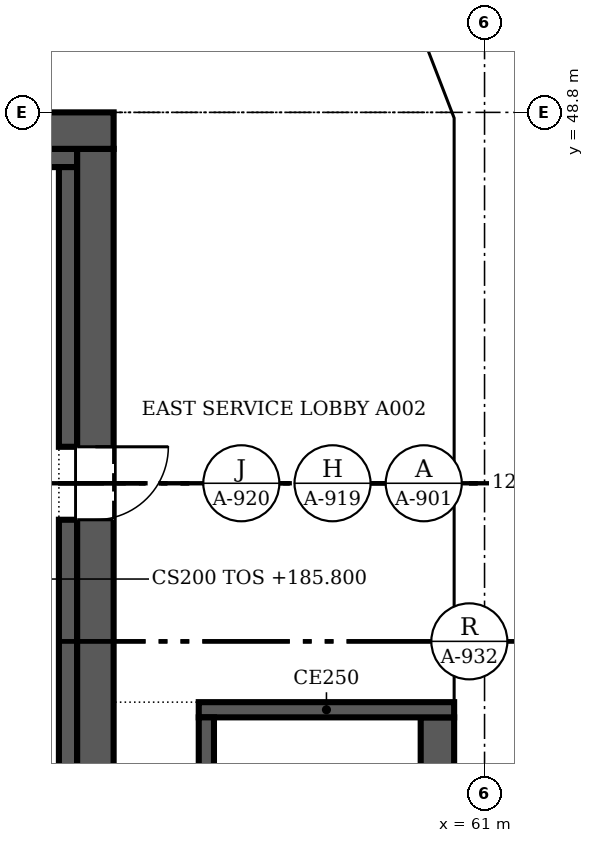
"""IFC4 building model, lengths in metres.
Left out: names, types, materials, properties, quantities, classifications, styles, units other than length and angle.
Written with IfcOpenShell. Run it as: python <this file> out.ifc"""

import sys

from ifc_helpers import new_model, si_unit, direction, frame, frame_2d, origin, place, context, subcontext, project, spatial, polyline, rectangle, outline, extrude, faceted_brep, source, transform, mapped, element, fill, save


model = new_model("IFC4")
c1 = context("Model", 3, precision=1e-05, world=origin(), true_north=direction((0.0, 1.0)))
c2 = subcontext(c1, "Body", "Model", "MODEL_VIEW")
j1 = project(units=[si_unit("LENGTHUNIT", "METRE"), si_unit("PLANEANGLEUNIT", "RADIAN")], contexts=[c1])
p1 = place(None, origin())
s1 = spatial("IfcSite", under=j1, at=p1, CompositionType="ELEMENT")
p2 = place(p1, origin())
s2 = spatial("IfcBuilding", under=s1, at=p2, CompositionType="ELEMENT")
p3 = place(p2, frame((0.0, 0.0, 185.8)))
s3 = spatial("IfcBuildingStorey", under=s2, at=p3, CompositionType="ELEMENT", Elevation=185.8)
m1 = source(origin(), c2, "Body", "Brep", [
    faceted_brep([(3.05, -0.25, 0.0), (6.1, -0.25, 3.8), (6.1, -0.25, 3.8), (3.05, -0.25, 7.6), (0.0, -0.25, 3.8), (0.0, 0.25, 3.8), (3.05, 0.25, 7.6), (6.1, 0.25, 3.8), (6.1, 0.25, 3.8), (3.05, 0.25, 0.0)], [[[0, 1, 2, 3, 4]], [[5, 6, 7, 8, 9]], [[9, 8, 1, 0]], [[7, 6, 3, 2]], [[6, 5, 4, 3]], [[5, 9, 0, 4]], [[1, 8, 7, 2]]]),
])
p4 = place(p3, frame((60.75, 36.6, -3.8), z_axis=(0.0, 0.0, 1.0), x_axis=(0.0, 1.0, 0.0)))
e1 = element("IfcWall", 1, at=p4, inside=s3, PredefinedType="SOLIDWALL", context=c2, shape_type="MappedRepresentation", body=[
    mapped(m1, transform((0.0, 0.0, 0.0), scale=1.0)),
])
m2 = source(origin(), c2, "Body", "SweptSolid", [
    extrude(outline(polyline([(3.05, 0.399), (5.78, 3.8), (3.05, 7.201), (0.321, 3.8), (3.05, 0.399)])), frame((0.0, 0.26, 0.0), z_axis=(0.0, -1.0, 0.0), x_axis=(1.0, 0.0, 0.0)), (0.0, 0.0, 1.0), 0.52),
])
p5 = place(p4, origin())
e2 = element("IfcOpeningElement", 2, at=p5, cuts=e1, PredefinedType="OPENING", context=c2, shape_type="MappedRepresentation", body=[
    mapped(m2, transform((0.0, 0.0, 0.0), scale=1.0)),
])
m3 = source(origin(), c2, "Body", "Brep", [
    faceted_brep([(3.05, -0.25, 0.0), (6.053, -0.25, 3.8), (3.05, -0.25, 7.6), (0.0, -0.25, 3.8), (0.0, 0.25, 3.8), (3.05, 0.25, 7.6), (6.007, 0.25, 3.859), (6.007, 0.25, 3.741), (3.05, 0.25, 0.0), (6.053, 0.0, 3.8)], [[[0, 1, 2, 3]], [[4, 5, 6, 7, 8]], [[8, 7, 9, 1, 0]], [[6, 5, 2, 1, 9]], [[5, 4, 3, 2]], [[4, 8, 0, 3]], [[9, 7, 6]]]),
])
p6 = place(p3, frame((60.75, 42.7, -3.8), z_axis=(0.0, 0.0, 1.0), x_axis=(0.0, 1.0, 0.0)))
e3 = element("IfcWall", 3, at=p6, inside=s3, PredefinedType="SOLIDWALL", context=c2, shape_type="MappedRepresentation", body=[
    mapped(m3, transform((0.0, 0.0, 0.0), scale=1.0)),
])
m4 = source(origin(), c2, "Body", "SweptSolid", [
    extrude(outline(polyline([(3.049, 0.401), (5.735, 3.8), (3.049, 7.199), (0.321, 3.8), (3.049, 0.401)])), frame((0.0, 0.26, 0.0), z_axis=(0.0, -1.0, 0.0), x_axis=(1.0, 0.0, 0.0)), (0.0, 0.0, 1.0), 0.52),
])
p7 = place(p6, origin())
e4 = element("IfcOpeningElement", 4, at=p7, cuts=e3, PredefinedType="OPENING", context=c2, shape_type="MappedRepresentation", body=[
    mapped(m4, transform((0.0, 0.0, 0.0), scale=1.0)),
])
m5 = source(origin(), c2, "Body", "Brep", [
    faceted_brep([(2.95, -0.25, 0.0), (3.003, -0.25, 0.068), (3.003, -0.25, 7.532), (2.95, -0.25, 7.6), (0.0, -0.25, 3.8), (0.047, 0.25, 3.86), (2.898, 0.25, 7.532), (2.898, 0.25, 0.068), (0.047, 0.25, 3.74), (2.95, 0.0, 0.0), (2.95, 0.0, 7.6), (0.0, 0.0, 3.8)], [[[0, 1, 2, 3, 4]], [[5, 6, 7, 8]], [[1, 0, 9]], [[10, 3, 2]], [[6, 5, 11, 4, 3, 10]], [[8, 7, 9, 0, 4, 11]], [[8, 11, 5]], [[1, 9, 7, 6, 10, 2]]]),
])
p8 = place(p3, frame((60.75, 48.753, -3.8), z_axis=(0.0, 0.0, 1.0), x_axis=(-0.35992665181, 0.932980602862, 0.0)))
e5 = element("IfcWall", 5, at=p8, inside=s3, PredefinedType="SOLIDWALL", context=c2, shape_type="MappedRepresentation", body=[
    mapped(m5, transform((0.0, 0.0, 0.0), scale=1.0)),
])
m6 = source(origin(), c2, "Body", "SweptSolid", [
    extrude(outline(polyline([(2.75, 6.935), (0.316, 3.8), (2.75, 0.665), (2.75, 6.935)])), frame((0.0, 0.26, 0.0), z_axis=(0.0, -1.0, 0.0), x_axis=(1.0, 0.0, 0.0)), (0.0, 0.0, 1.0), 0.52),
])
p9 = place(p8, origin())
e6 = element("IfcOpeningElement", 6, at=p9, cuts=e5, PredefinedType="OPENING", context=c2, shape_type="MappedRepresentation", body=[
    mapped(m6, transform((0.0, 0.0, 0.0), scale=1.0)),
])
p10 = place(p2, frame((0.0, 0.0, 189.6)))
s4 = spatial("IfcBuildingStorey", under=s2, at=p10, CompositionType="ELEMENT", Elevation=189.6)
m7 = source(origin(), c2, "Body", "Brep", [
    faceted_brep([(3.05, -0.25, 0.0), (6.1, -0.25, 3.8), (6.1, -0.25, 3.8), (3.05, -0.25, 7.6), (0.0, -0.25, 3.8), (0.0, 0.25, 3.8), (3.05, 0.25, 7.6), (6.1, 0.25, 3.8), (6.1, 0.25, 3.8), (3.05, 0.25, 0.0)], [[[0, 1, 2, 3, 4]], [[5, 6, 7, 8, 9]], [[9, 8, 1, 0]], [[7, 6, 3, 2]], [[6, 5, 4, 3]], [[5, 9, 0, 4]], [[1, 8, 7, 2]]]),
])
p11 = place(p10, frame((60.75, 33.55, -3.8), z_axis=(0.0, 0.0, 1.0), x_axis=(0.0, 1.0, 0.0)))
e7 = element("IfcWall", 7, at=p11, inside=s4, PredefinedType="SOLIDWALL", context=c2, shape_type="MappedRepresentation", body=[
    mapped(m7, transform((0.0, 0.0, 0.0), scale=1.0)),
])
m8 = source(origin(), c2, "Body", "SweptSolid", [
    extrude(outline(polyline([(3.05, 0.399), (5.78, 3.8), (3.05, 7.2), (0.321, 3.8), (3.05, 0.399)])), frame((0.0, 0.26, 0.0), z_axis=(0.0, -1.0, 0.0), x_axis=(1.0, 0.0, 0.0)), (0.0, 0.0, 1.0), 0.52),
])
p12 = place(p11, origin())
e8 = element("IfcOpeningElement", 8, at=p12, cuts=e7, PredefinedType="OPENING", context=c2, shape_type="MappedRepresentation", body=[
    mapped(m8, transform((0.0, 0.0, 0.0), scale=1.0)),
])
m9 = source(origin(), c2, "Body", "SweptSolid", [
    extrude(outline(polyline([(3.05, 0.0), (6.1, 3.8), (3.05, 7.6), (0.0, 3.8), (3.05, 0.0)])), frame((0.0, 0.25, 0.0), z_axis=(0.0, -1.0, 0.0), x_axis=(1.0, 0.0, 0.0)), (0.0, 0.0, 1.0), 0.5),
])
p13 = place(p10, frame((60.75, 39.65, -3.8), z_axis=(0.0, 0.0, 1.0), x_axis=(0.0, 1.0, 0.0)))
e9 = element("IfcWall", 9, at=p13, inside=s4, PredefinedType="SOLIDWALL", context=c2, shape_type="MappedRepresentation", body=[
    mapped(m9, transform((0.0, 0.0, 0.0), scale=1.0)),
])
p14 = place(p13, origin())
e10 = element("IfcOpeningElement", 10, at=p14, cuts=e9, PredefinedType="OPENING", context=c2, shape_type="MappedRepresentation", body=[
    mapped(m8, transform((0.0, 0.0, 0.0), scale=1.0)),
])
m10 = source(origin(), c2, "Body", "Brep", [
    faceted_brep([(3.003, -0.25, 0.0), (3.05, -0.25, 0.06), (3.05, -0.25, 7.54), (3.003, -0.25, 7.6), (0.0, -0.25, 3.8), (0.0, 0.25, 3.8), (2.957, 0.25, 7.541), (2.957, 0.25, 0.059), (3.003, 0.0, 0.0), (3.003, 0.0, 7.6)], [[[0, 1, 2, 3, 4]], [[5, 6, 7]], [[1, 0, 8]], [[9, 3, 2]], [[6, 5, 4, 3, 9]], [[5, 7, 8, 0, 4]], [[1, 8, 7, 6, 9, 2]]]),
])
p15 = place(p10, frame((60.75, 45.75, -3.8), z_axis=(0.0, 0.0, 1.0), x_axis=(0.0, 1.0, 0.0)))
e11 = element("IfcWall", 11, at=p15, inside=s4, PredefinedType="SOLIDWALL", context=c2, shape_type="MappedRepresentation", body=[
    mapped(m10, transform((0.0, 0.0, 0.0), scale=1.0)),
])
m11 = source(origin(), c2, "Body", "SweptSolid", [
    extrude(outline(polyline([(2.803, 6.944), (0.319, 3.8), (2.803, 0.656), (2.803, 6.944)])), frame((0.0, 0.26, 0.0), z_axis=(0.0, -1.0, 0.0), x_axis=(1.0, 0.0, 0.0)), (0.0, 0.0, 1.0), 0.52),
])
p16 = place(p15, origin())
e12 = element("IfcOpeningElement", 12, at=p16, cuts=e11, PredefinedType="OPENING", context=c2, shape_type="MappedRepresentation", body=[
    mapped(m11, transform((0.0, 0.0, 0.0), scale=1.0)),
])
m12 = source(origin(), c2, "Body", "Brep", [
    faceted_brep([(0.047, -0.25, 0.0), (2.997, -0.25, 3.8), (0.047, -0.25, 7.6), (0.0, -0.25, 7.541), (0.0, -0.25, 0.059), (0.093, 0.25, 7.54), (2.944, 0.25, 3.868), (2.944, 0.25, 3.732), (0.093, 0.25, 0.06), (2.997, 0.0, 3.8), (0.047, 0.0, 0.0), (0.047, 0.0, 7.6)], [[[0, 1, 2, 3, 4]], [[5, 6, 7, 8]], [[8, 7, 9, 1, 0, 10]], [[6, 5, 11, 2, 1, 9]], [[3, 2, 11]], [[10, 0, 4]], [[8, 10, 4, 3, 11, 5]], [[7, 6, 9]]]),
])
p17 = place(p10, frame((60.767, 48.71, -3.8), z_axis=(0.0, 0.0, 1.0), x_axis=(-0.359901446078, 0.932990326376, 0.0)))
e13 = element("IfcWall", 13, at=p17, inside=s4, PredefinedType="SOLIDWALL", context=c2, shape_type="MappedRepresentation", body=[
    mapped(m12, transform((0.0, 0.0, 0.0), scale=1.0)),
])
m13 = source(origin(), c2, "Body", "SweptSolid", [
    extrude(outline(polyline([(0.247, 0.665), (2.681, 3.8), (0.247, 6.935), (0.247, 0.665)])), frame((0.0, 0.26, 0.0), z_axis=(0.0, -1.0, 0.0), x_axis=(1.0, 0.0, 0.0)), (0.0, 0.0, 1.0), 0.52),
])
p18 = place(p17, origin())
e14 = element("IfcOpeningElement", 14, at=p18, cuts=e13, PredefinedType="OPENING", context=c2, shape_type="MappedRepresentation", body=[
    mapped(m13, transform((0.0, 0.0, 0.0), scale=1.0)),
])
p19 = place(p3, frame((30.5, 48.5, 0.0), z_axis=(0.0, 0.0, 1.0), x_axis=(1.0, 0.0, 0.0)))
e15 = element("IfcWall", 15, at=p19, inside=s3, PredefinedType="SHEAR", context=c2, shape_type="SweptSolid", body=[
    extrude(rectangle(XDim=24.4, YDim=0.6, at=frame_2d((12.2, 0.0))), origin(), (0.0, 0.0, 1.0), 3.8),
])
p20 = place(p3, frame((54.6, 48.2, 0.0), z_axis=(0.0, 0.0, 1.0), x_axis=(0.0, -1.0, 0.0)))
e16 = element("IfcWall", 16, at=p20, inside=s3, PredefinedType="SHEAR", context=c2, shape_type="SweptSolid", body=[
    extrude(rectangle(XDim=23.2, YDim=0.6, at=frame_2d((11.6, 0.0))), origin(), (0.0, 0.0, 1.0), 3.8),
])
m14 = source(origin(), c2, "Body", "SweptSolid", [
    extrude(rectangle(XDim=1.2, YDim=2.1, at=frame_2d((0.6, 1.05))), frame((0.0, 0.31, 0.0), z_axis=(0.0, -1.0, 0.0), x_axis=(1.0, 0.0, 0.0)), (0.0, 0.0, 1.0), 0.62),
])
p21 = place(p20, frame((4.9, 0.0, 0.0)))
e17 = element("IfcOpeningElement", 17, at=p21, cuts=e16, PredefinedType="OPENING", context=c2, shape_type="MappedRepresentation", body=[
    mapped(m14, transform((0.0, 0.0, 0.0), scale=1.0)),
])
p22 = place(p3, frame((31.1, 48.05, 0.0), z_axis=(0.0, 0.0, 1.0), x_axis=(1.0, 0.0, 0.0)))
e18 = element("IfcWall", 18, at=p22, inside=s3, PredefinedType="SOLIDWALL", context=c2, shape_type="SweptSolid", body=[
    extrude(rectangle(XDim=23.2, YDim=0.3, at=frame_2d((11.6, 0.0))), origin(), (0.0, 0.0, 1.0), 3.8),
])
p23 = place(p3, frame((54.15, 36.88, 0.0), z_axis=(0.0, 0.0, 1.0), x_axis=(0.0, 1.0, 0.0)))
e19 = element("IfcWall", 19, at=p23, inside=s3, PredefinedType="SOLIDWALL", context=c2, shape_type="SweptSolid", body=[
    extrude(rectangle(XDim=5.22, YDim=0.3, at=frame_2d((2.61, 0.0))), origin(), (0.0, 0.0, 1.0), 3.8),
])
p24 = place(p3, frame((54.15, 43.3, 0.0), z_axis=(0.0, 0.0, 1.0), x_axis=(0.0, 1.0, 0.0)))
e20 = element("IfcWall", 20, at=p24, inside=s3, PredefinedType="SOLIDWALL", context=c2, shape_type="SweptSolid", body=[
    extrude(rectangle(XDim=4.6, YDim=0.3, at=frame_2d((2.3, 0.0))), origin(), (0.0, 0.0, 1.0), 3.8),
])
p25 = place(p3, frame((56.425, 30.85, 0.0), z_axis=(0.0, 0.0, 1.0), x_axis=(0.0, 1.0, 0.0)))
e21 = element("IfcWall", 21, at=p25, inside=s3, PredefinedType="SOLIDWALL", context=c2, shape_type="SweptSolid", body=[
    extrude(rectangle(XDim=8.0, YDim=0.25, at=frame_2d((4.0, 0.0))), origin(), (0.0, 0.0, 1.0), 3.8),
])
p26 = place(p3, frame((56.3, 38.975, 0.0), z_axis=(0.0, 0.0, 1.0), x_axis=(1.0, 0.0, 0.0)))
e22 = element("IfcWall", 22, at=p26, inside=s3, PredefinedType="SOLIDWALL", context=c2, shape_type="SweptSolid", body=[
    extrude(rectangle(XDim=4.2, YDim=0.25, at=frame_2d((2.1, 0.0))), origin(), (0.0, 0.0, 1.0), 3.8),
])
p27 = place(p3, frame((60.225, 38.85, 0.0), z_axis=(0.0, 0.0, 1.0), x_axis=(0.0, -1.0, 0.0)))
e23 = element("IfcWall", 23, at=p27, inside=s3, PredefinedType="SOLIDWALL", context=c2, shape_type="SweptSolid", body=[
    extrude(rectangle(XDim=8.0, YDim=0.55, at=frame_2d((4.0, 0.0))), origin(), (0.0, 0.0, 1.0), 3.8),
])
m15 = source(origin(), c2, "Body", "SweptSolid", [
    extrude(rectangle(XDim=1.2, YDim=2.1, at=frame_2d((0.6, 1.05))), frame((0.0, 0.025, 0.0), z_axis=(0.0, -1.0, 0.0), x_axis=(1.0, 0.0, 0.0)), (0.0, 0.0, 1.0), 0.05),
])
p28 = place(p21, origin())
e24 = element("IfcDoor", 24, at=p28, inside=s3, OperationType="SINGLE_SWING_LEFT", PredefinedType="DOOR", context=c2, shape_type="MappedRepresentation", body=[
    mapped(m15, transform((0.0, 0.0, 0.0), scale=1.0)),
])
fill(e17, e24)
save(model, sys.argv[1])
